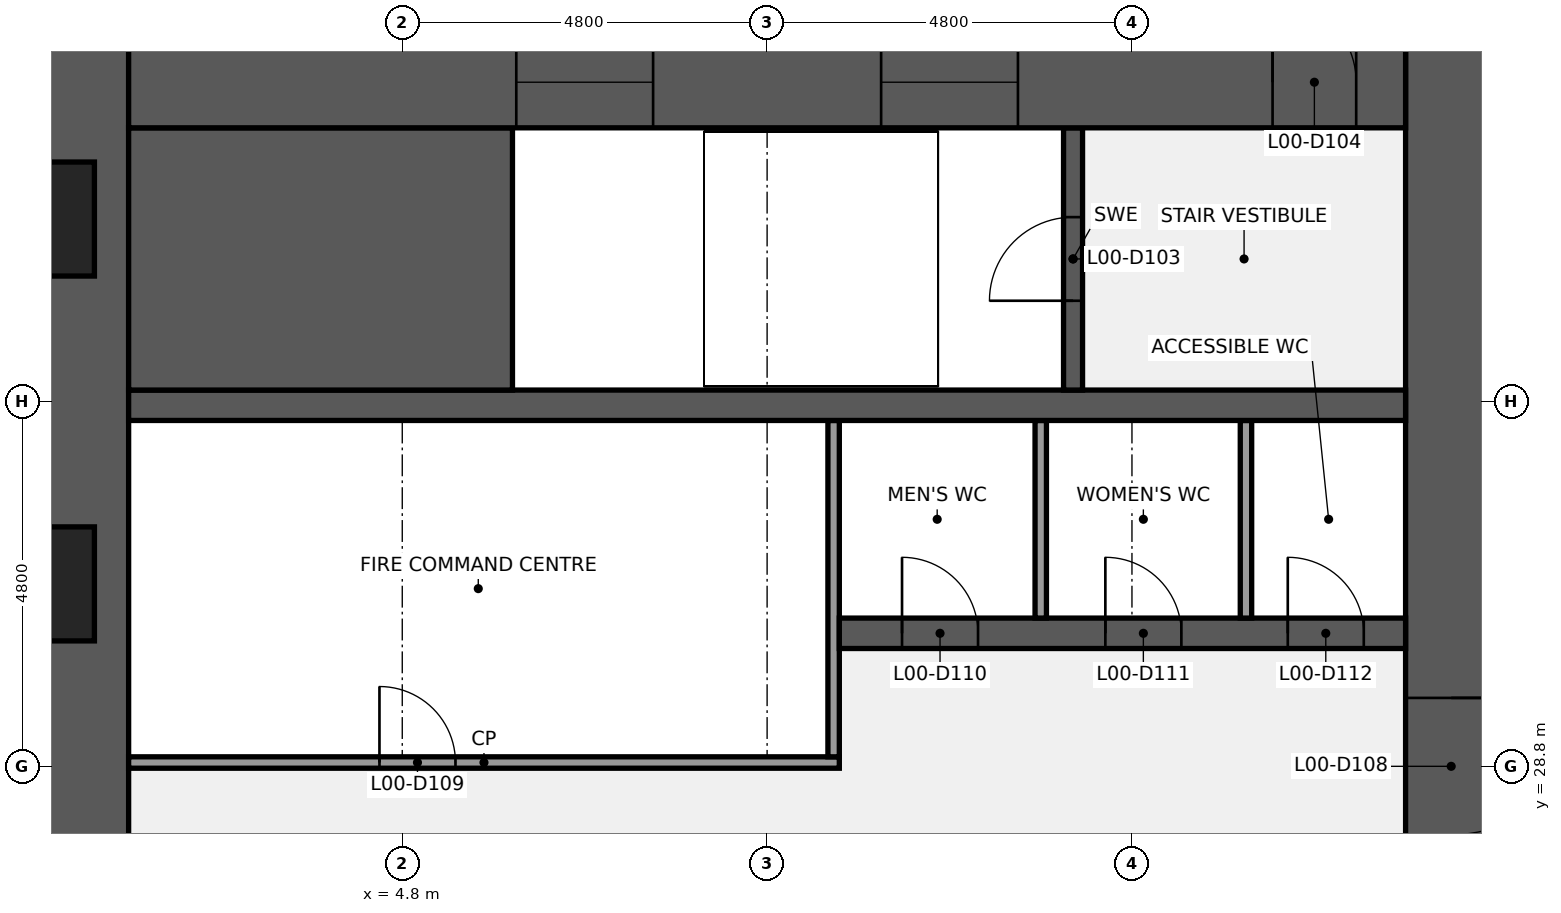
"""IFC4 building model, lengths in metres.
Left out: names, types, materials, properties, quantities, classifications, styles, units other than length and angle.
Written with IfcOpenShell. Run it as: python <this file> out.ifc"""

import sys

from ifc_helpers import new_model, si_unit, direction, frame, frame_2d, origin, place, context, subcontext, project, spatial, rectangle, extrude, element, fill, save


model = new_model("IFC4")
c1 = context("Model", 3, precision=1e-05, world=origin(), true_north=direction((0.0, 1.0)))
c2 = subcontext(c1, "Body", "Model", "MODEL_VIEW")
j1 = project(units=[si_unit("LENGTHUNIT", "METRE"), si_unit("PLANEANGLEUNIT", "RADIAN")], contexts=[c1])
p1 = place(None, origin())
s1 = spatial("IfcSite", under=j1, at=p1, CompositionType="ELEMENT")
p2 = place(p1, origin())
s2 = spatial("IfcBuilding", under=s1, at=p2, CompositionType="ELEMENT")
p3 = place(p2, origin())
s3 = spatial("IfcBuildingStorey", under=s2, at=p3, CompositionType="ELEMENT", Elevation=0.0)
p4 = place(p3, frame((0.6, 9.6, -2.0), z_axis=(0.0, 0.0, 1.0), x_axis=(0.0, 1.0, 0.0)))
e1 = element("IfcWall", 1, at=p4, inside=s3, PredefinedType="SHEAR", context=c2, shape_type="SweptSolid", body=[
    extrude(rectangle(XDim=28.8, YDim=1.2, at=frame_2d((14.4, 0.0))), origin(), (0.0, 0.0, 1.0), 14.3),
])
p5 = place(p4, frame((8.85, 0.0, 2.9)))
e2 = element("IfcOpeningElement", 2, at=p5, cuts=e1, PredefinedType="OPENING", context=c2, shape_type="SweptSolid", body=[
    extrude(rectangle(XDim=1.5, YDim=1.5, at=frame_2d((0.75, 0.75))), frame((0.0, 0.61, 0.0), z_axis=(0.0, -1.0, 0.0), x_axis=(1.0, 0.0, 0.0)), (0.0, 0.0, 1.0), 1.22),
])
p6 = place(p3, frame((18.6, 38.4, -2.0), z_axis=(0.0, 0.0, 1.0), x_axis=(0.0, -1.0, 0.0)))
e3 = element("IfcWall", 3, at=p6, inside=s3, PredefinedType="SHEAR", context=c2, shape_type="SweptSolid", body=[
    extrude(rectangle(XDim=28.8, YDim=1.2, at=frame_2d((14.4, 0.0))), origin(), (0.0, 0.0, 1.0), 14.3),
])
p7 = place(p6, frame((18.3, 0.0, 2.0)))
e4 = element("IfcOpeningElement", 4, at=p7, cuts=e3, PredefinedType="OPENING", context=c2, shape_type="SweptSolid", body=[
    extrude(rectangle(XDim=1.8, YDim=2.1, at=frame_2d((0.9, 1.05))), frame((0.0, 0.61, 0.0), z_axis=(0.0, -1.0, 0.0), x_axis=(1.0, 0.0, 0.0)), (0.0, 0.0, 1.0), 1.22),
])
p8 = place(p6, frame((8.7, 0.0, 2.0)))
e5 = element("IfcOpeningElement", 5, at=p8, cuts=e3, PredefinedType="OPENING", context=c2, shape_type="SweptSolid", body=[
    extrude(rectangle(XDim=1.8, YDim=2.1, at=frame_2d((0.9, 1.05))), frame((0.0, 0.61, 0.0), z_axis=(0.0, -1.0, 0.0), x_axis=(1.0, 0.0, 0.0)), (0.0, 0.0, 1.0), 1.22),
])
p9 = place(p3, frame((1.2, 28.85, 0.0), z_axis=(0.0, 0.0, 1.0), x_axis=(1.0, 0.0, 0.0)))
e6 = element("IfcWall", 6, at=p9, inside=s3, PredefinedType="PARTITIONING", context=c2, shape_type="SweptSolid", body=[
    extrude(rectangle(XDim=9.35, YDim=0.15, at=frame_2d((4.675, 0.0))), origin(), (0.0, 0.0, 1.0), 12.3),
])
p10 = place(p9, frame((3.3, 0.0, 0.0)))
e7 = element("IfcOpeningElement", 7, at=p10, cuts=e6, PredefinedType="OPENING", context=c2, shape_type="SweptSolid", body=[
    extrude(rectangle(XDim=1.0, YDim=2.1, at=frame_2d((0.5, 1.05))), frame((0.0, 0.085, 0.0), z_axis=(0.0, -1.0, 0.0), x_axis=(1.0, 0.0, 0.0)), (0.0, 0.0, 1.0), 0.17),
])
p11 = place(p3, frame((10.475, 28.925, 0.0), z_axis=(0.0, 0.0, 1.0), x_axis=(0.0, 1.0, 0.0)))
e8 = element("IfcWall", 8, at=p11, inside=s3, PredefinedType="PARTITIONING", context=c2, shape_type="SweptSolid", body=[
    extrude(rectangle(XDim=4.425, YDim=0.15, at=frame_2d((2.212, 0.0))), origin(), (0.0, 0.0, 1.0), 12.3),
])
p12 = place(p3, frame((10.55, 30.55, -2.0), z_axis=(0.0, 0.0, 1.0), x_axis=(1.0, 0.0, 0.0)))
e9 = element("IfcWall", 9, at=p12, inside=s3, PredefinedType="SHEAR", context=c2, shape_type="SweptSolid", body=[
    extrude(rectangle(XDim=7.45, YDim=0.4, at=frame_2d((3.725, 0.0))), origin(), (0.0, 0.0, 1.0), 14.3),
])
p13 = place(p12, frame((0.825, 0.0, 2.0)))
e10 = element("IfcOpeningElement", 10, at=p13, cuts=e9, PredefinedType="OPENING", context=c2, shape_type="SweptSolid", body=[
    extrude(rectangle(XDim=1.0, YDim=2.1, at=frame_2d((0.5, 1.05))), frame((0.0, 0.21, 0.0), z_axis=(0.0, -1.0, 0.0), x_axis=(1.0, 0.0, 0.0)), (0.0, 0.0, 1.0), 0.42),
])
p14 = place(p12, frame((3.5, 0.0, 2.0)))
e11 = element("IfcOpeningElement", 11, at=p14, cuts=e9, PredefinedType="OPENING", context=c2, shape_type="SweptSolid", body=[
    extrude(rectangle(XDim=1.0, YDim=2.1, at=frame_2d((0.5, 1.05))), frame((0.0, 0.21, 0.0), z_axis=(0.0, -1.0, 0.0), x_axis=(1.0, 0.0, 0.0)), (0.0, 0.0, 1.0), 0.42),
])
p15 = place(p12, frame((5.9, 0.0, 2.0)))
e12 = element("IfcOpeningElement", 12, at=p15, cuts=e9, PredefinedType="OPENING", context=c2, shape_type="SweptSolid", body=[
    extrude(rectangle(XDim=1.0, YDim=2.1, at=frame_2d((0.5, 1.05))), frame((0.0, 0.21, 0.0), z_axis=(0.0, -1.0, 0.0), x_axis=(1.0, 0.0, 0.0)), (0.0, 0.0, 1.0), 0.42),
])
for number, where, z_axis, x_axis in (
    (13, (13.2, 30.75, 0.0), (0.0, 0.0, 1.0), (0.0, 1.0, 0.0)),
    (14, (15.9, 30.75, 0.0), (0.0, 0.0, 1.0), (0.0, 1.0, 0.0)),
):
    element("IfcWall", number, at=place(p3, frame(where, z_axis=z_axis, x_axis=x_axis)), inside=s3, PredefinedType="PARTITIONING", context=c2, shape_type="SweptSolid", body=[
        extrude(rectangle(XDim=2.6, YDim=0.15, at=frame_2d((1.3, 0.0))), origin(), (0.0, 0.0, 1.0), 12.3),
    ])
p16 = place(p3, frame((1.2, 33.55, -2.0), z_axis=(0.0, 0.0, 1.0), x_axis=(1.0, 0.0, 0.0)))
e15 = element("IfcWall", 15, at=p16, inside=s3, PredefinedType="SHEAR", context=c2, shape_type="SweptSolid", body=[
    extrude(rectangle(XDim=16.8, YDim=0.4, at=frame_2d((8.4, 0.0))), origin(), (0.0, 0.0, 1.0), 14.3),
])
p17 = place(p3, frame((1.2, 35.475, -2.0), z_axis=(0.0, 0.0, 1.0), x_axis=(1.0, 0.0, 0.0)))
e16 = element("IfcWall", 16, at=p17, inside=s3, PredefinedType="SHEAR", context=c2, shape_type="SweptSolid", body=[
    extrude(rectangle(XDim=5.05, YDim=3.45, at=frame_2d((2.525, 0.0))), origin(), (0.0, 0.0, 1.0), 14.3),
])
p18 = place(p3, frame((13.625, 33.75, -2.0), z_axis=(0.0, 0.0, 1.0), x_axis=(0.0, 1.0, 0.0)))
e17 = element("IfcWall", 17, at=p18, inside=s3, PredefinedType="SHEAR", context=c2, shape_type="SweptSolid", body=[
    extrude(rectangle(XDim=3.45, YDim=0.25, at=frame_2d((1.725, 0.0))), origin(), (0.0, 0.0, 1.0), 14.3),
])
p19 = place(p18, frame((1.175, 0.0, 2.0)))
e18 = element("IfcOpeningElement", 18, at=p19, cuts=e17, PredefinedType="OPENING", context=c2, shape_type="SweptSolid", body=[
    extrude(rectangle(XDim=1.1, YDim=2.1, at=frame_2d((0.55, 1.05))), frame((0.0, 0.135, 0.0), z_axis=(0.0, -1.0, 0.0), x_axis=(1.0, 0.0, 0.0)), (0.0, 0.0, 1.0), 0.27),
])
p20 = place(p3, frame((1.2, 37.8, -2.0), z_axis=(0.0, 0.0, 1.0), x_axis=(1.0, 0.0, 0.0)))
e19 = element("IfcWall", 19, at=p20, inside=s3, PredefinedType="SHEAR", context=c2, shape_type="SweptSolid", body=[
    extrude(rectangle(XDim=16.8, YDim=1.2, at=frame_2d((8.4, 0.0))), origin(), (0.0, 0.0, 1.0), 14.3),
])
p21 = place(p20, frame((15.05, 0.0, 2.0)))
e20 = element("IfcOpeningElement", 20, at=p21, cuts=e19, PredefinedType="OPENING", context=c2, shape_type="SweptSolid", body=[
    extrude(rectangle(XDim=1.1, YDim=2.1, at=frame_2d((0.55, 1.05))), frame((0.0, 0.61, 0.0), z_axis=(0.0, -1.0, 0.0), x_axis=(1.0, 0.0, 0.0)), (0.0, 0.0, 1.0), 1.22),
])
p22 = place(p20, frame((5.1, 0.0, 2.9)))
e21 = element("IfcOpeningElement", 21, at=p22, cuts=e19, PredefinedType="OPENING", context=c2, shape_type="SweptSolid", body=[
    extrude(rectangle(XDim=1.8, YDim=1.5, at=frame_2d((0.9, 0.75))), frame((0.0, 0.61, 0.0), z_axis=(0.0, -1.0, 0.0), x_axis=(1.0, 0.0, 0.0)), (0.0, 0.0, 1.0), 1.22),
])
p23 = place(p20, frame((9.9, 0.0, 2.9)))
e22 = element("IfcOpeningElement", 22, at=p23, cuts=e19, PredefinedType="OPENING", context=c2, shape_type="SweptSolid", body=[
    extrude(rectangle(XDim=1.8, YDim=1.5, at=frame_2d((0.9, 0.75))), frame((0.0, 0.61, 0.0), z_axis=(0.0, -1.0, 0.0), x_axis=(1.0, 0.0, 0.0)), (0.0, 0.0, 1.0), 1.22),
])
p24 = place(p19, origin())
e23 = element("IfcDoor", 23, at=p24, inside=s3, OperationType="SINGLE_SWING_LEFT", PredefinedType="DOOR", context=c2, shape_type="SweptSolid", body=[
    extrude(rectangle(XDim=1.1, YDim=2.1, at=frame_2d((0.55, 1.05))), frame((0.0, 0.025, 0.0), z_axis=(0.0, -1.0, 0.0), x_axis=(1.0, 0.0, 0.0)), (0.0, 0.0, 1.0), 0.05),
])
fill(e18, e23)
p25 = place(p21, origin())
e24 = element("IfcDoor", 24, at=p25, inside=s3, OperationType="SINGLE_SWING_LEFT", PredefinedType="DOOR", context=c2, shape_type="SweptSolid", body=[
    extrude(rectangle(XDim=1.1, YDim=2.1, at=frame_2d((0.55, 1.05))), frame((0.0, 0.025, 0.0), z_axis=(0.0, -1.0, 0.0), x_axis=(1.0, 0.0, 0.0)), (0.0, 0.0, 1.0), 0.05),
])
fill(e20, e24)
p26 = place(p8, origin())
e25 = element("IfcDoor", 25, at=p26, inside=s3, OperationType="DOUBLE_DOOR_SINGLE_SWING", PredefinedType="DOOR", context=c2, shape_type="SweptSolid", body=[
    extrude(rectangle(XDim=1.8, YDim=2.1, at=frame_2d((0.9, 1.05))), frame((0.0, 0.025, 0.0), z_axis=(0.0, -1.0, 0.0), x_axis=(1.0, 0.0, 0.0)), (0.0, 0.0, 1.0), 0.05),
])
fill(e5, e25)
p27 = place(p10, origin())
e26 = element("IfcDoor", 26, at=p27, inside=s3, OperationType="SINGLE_SWING_LEFT", PredefinedType="DOOR", context=c2, shape_type="SweptSolid", body=[
    extrude(rectangle(XDim=1.0, YDim=2.1, at=frame_2d((0.5, 1.05))), frame((0.0, 0.025, 0.0), z_axis=(0.0, -1.0, 0.0), x_axis=(1.0, 0.0, 0.0)), (0.0, 0.0, 1.0), 0.05),
])
fill(e7, e26)
p28 = place(p13, origin())
e27 = element("IfcDoor", 27, at=p28, inside=s3, OperationType="SINGLE_SWING_LEFT", PredefinedType="DOOR", context=c2, shape_type="SweptSolid", body=[
    extrude(rectangle(XDim=1.0, YDim=2.1, at=frame_2d((0.5, 1.05))), frame((0.0, 0.025, 0.0), z_axis=(0.0, -1.0, 0.0), x_axis=(1.0, 0.0, 0.0)), (0.0, 0.0, 1.0), 0.05),
])
fill(e10, e27)
p29 = place(p14, origin())
e28 = element("IfcDoor", 28, at=p29, inside=s3, OperationType="SINGLE_SWING_LEFT", PredefinedType="DOOR", context=c2, shape_type="SweptSolid", body=[
    extrude(rectangle(XDim=1.0, YDim=2.1, at=frame_2d((0.5, 1.05))), frame((0.0, 0.025, 0.0), z_axis=(0.0, -1.0, 0.0), x_axis=(1.0, 0.0, 0.0)), (0.0, 0.0, 1.0), 0.05),
])
fill(e11, e28)
p30 = place(p15, origin())
e29 = element("IfcDoor", 29, at=p30, inside=s3, OperationType="SINGLE_SWING_LEFT", PredefinedType="DOOR", context=c2, shape_type="SweptSolid", body=[
    extrude(rectangle(XDim=1.0, YDim=2.1, at=frame_2d((0.5, 1.05))), frame((0.0, 0.025, 0.0), z_axis=(0.0, -1.0, 0.0), x_axis=(1.0, 0.0, 0.0)), (0.0, 0.0, 1.0), 0.05),
])
fill(e12, e29)
p31 = place(p22, origin())
e30 = element("IfcWindow", 30, at=p31, inside=s3, PartitioningType="SINGLE_PANEL", PredefinedType="WINDOW", context=c2, shape_type="SweptSolid", body=[
    extrude(rectangle(XDim=1.8, YDim=1.5, at=frame_2d((0.9, 0.75))), frame((0.0, 0.03, 0.0), z_axis=(0.0, -1.0, 0.0), x_axis=(1.0, 0.0, 0.0)), (0.0, 0.0, 1.0), 0.06),
])
fill(e21, e30)
p32 = place(p23, origin())
e31 = element("IfcWindow", 31, at=p32, inside=s3, PartitioningType="SINGLE_PANEL", PredefinedType="WINDOW", context=c2, shape_type="SweptSolid", body=[
    extrude(rectangle(XDim=1.8, YDim=1.5, at=frame_2d((0.9, 0.75))), frame((0.0, 0.03, 0.0), z_axis=(0.0, -1.0, 0.0), x_axis=(1.0, 0.0, 0.0)), (0.0, 0.0, 1.0), 0.06),
])
fill(e22, e31)
save(model, sys.argv[1])
